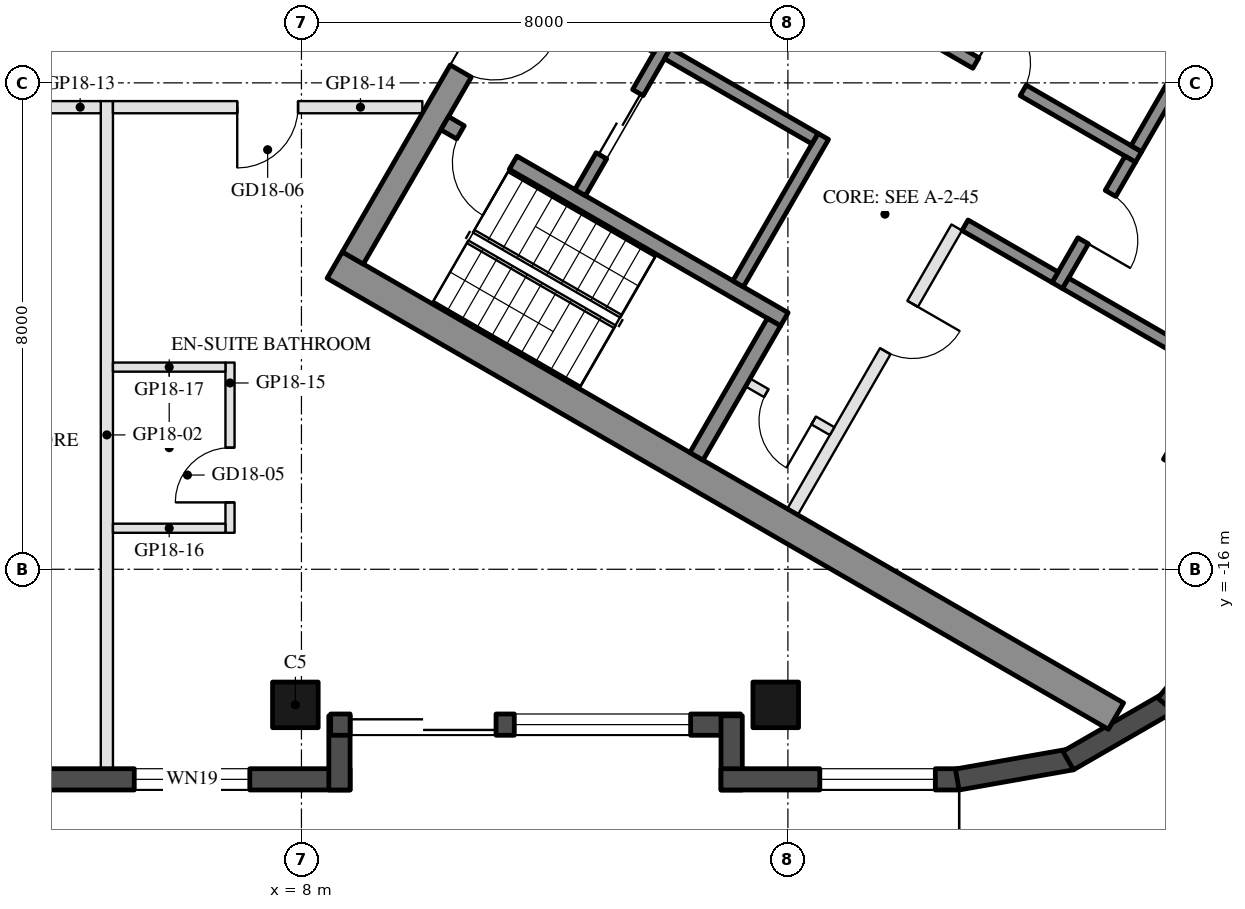
"""IFC4 building model, lengths in metres.
Left out: names, types, materials, properties, quantities, classifications, styles, units other than length and angle.
Written with IfcOpenShell. Run it as: python <this file> out.ifc"""

import sys

from ifc_helpers import new_model, si_unit, direction, frame, frame_2d, origin, origin_2d, place, context, subcontext, project, spatial, rectangle, hollow_rectangle, extrude, element, fill, save


model = new_model("IFC4")
c1 = context("Model", 3, precision=1e-05, world=origin(), true_north=direction((0.0, 1.0)))
c2 = subcontext(c1, "Body", "Model", "MODEL_VIEW")
j1 = project(units=[si_unit("LENGTHUNIT", "METRE"), si_unit("PLANEANGLEUNIT", "RADIAN")], contexts=[c1])
p1 = place(None, origin())
s1 = spatial("IfcSite", under=j1, at=p1, CompositionType="ELEMENT")
p2 = place(p1, origin())
s2 = spatial("IfcBuilding", under=s1, at=p2, CompositionType="ELEMENT")
p3 = place(p2, frame((0.0, 0.0, 198.4)))
s3 = spatial("IfcBuildingStorey", under=s2, at=p3, CompositionType="ELEMENT", Elevation=198.4)
for number, where, z_axis, x_axis in (
    (1, (7.9, -18.23, 0.0), (0.0, 0.0, 1.0), (-1.0, 0.0, 0.0)),
    (2, (15.8, -18.23, 0.0), (0.0, 0.0, 1.0), (-1.0, 0.0, 0.0)),
):
    element("IfcColumn", number, at=place(p3, frame(where, z_axis=z_axis, x_axis=x_axis)), inside=s3, PredefinedType="COLUMN", context=c2, shape_type="SweptSolid", body=[
        extrude(hollow_rectangle(XDim=0.75, YDim=0.75, WallThickness=0.035, at=origin_2d()), origin(), (0.0, 0.0, 1.0), 3.7),
    ])
p4 = place(p3, frame((23.729, -13.7, 0.0), z_axis=(0.0, 0.0, 1.0), x_axis=(0.5, 0.866025403784, 0.0)))
e3 = element("IfcColumn", 3, at=p4, inside=s3, PredefinedType="COLUMN", context=c2, shape_type="SweptSolid", body=[
    extrude(hollow_rectangle(XDim=2.4, YDim=2.2, WallThickness=0.06, at=origin_2d()), origin(), (0.0, 0.0, 1.0), 3.7),
])
p5 = place(p3, frame((-0.9, -19.455, 0.0), z_axis=(0.0, 0.0, 1.0), x_axis=(1.0, 0.0, 0.0)))
e4 = element("IfcWall", 4, at=p5, inside=s3, PredefinedType="SOLIDWALL", context=c2, shape_type="SweptSolid", body=[
    extrude(rectangle(XDim=9.7, YDim=0.35, at=frame_2d((4.85, 0.0))), origin(), (0.0, 0.0, 1.0), 3.55),
])
p6 = place(p5, frame((6.15, 0.0, 0.3)))
e5 = element("IfcOpeningElement", 5, at=p6, cuts=e4, PredefinedType="OPENING", context=c2, shape_type="SweptSolid", body=[
    extrude(rectangle(XDim=1.9, YDim=2.65, at=frame_2d((0.95, 1.325))), frame((0.0, 0.185, 0.0), z_axis=(0.0, -1.0, 0.0), x_axis=(1.0, 0.0, 0.0)), (0.0, 0.0, 1.0), 0.37),
])
p7 = place(p3, frame((8.625, -19.63, 0.0), z_axis=(0.0, 0.0, 1.0), x_axis=(0.0, 1.0, 0.0)))
e6 = element("IfcWall", 6, at=p7, inside=s3, PredefinedType="SOLIDWALL", context=c2, shape_type="SweptSolid", body=[
    extrude(rectangle(XDim=1.22, YDim=0.35, at=frame_2d((0.61, 0.0))), origin(), (0.0, 0.0, 1.0), 3.55),
])
p8 = place(p3, frame((8.48, -18.555, 0.0), z_axis=(0.0, 0.0, 1.0), x_axis=(1.0, 0.0, 0.0)))
e7 = element("IfcWall", 7, at=p8, inside=s3, PredefinedType="SOLIDWALL", context=c2, shape_type="SweptSolid", body=[
    extrude(rectangle(XDim=6.74, YDim=0.35, at=frame_2d((3.37, 0.0))), origin(), (0.0, 0.0, 1.0), 3.55),
])
p9 = place(p8, frame((0.32, 0.0, 0.0)))
e8 = element("IfcOpeningElement", 8, at=p9, cuts=e7, PredefinedType="OPENING", context=c2, shape_type="SweptSolid", body=[
    extrude(rectangle(XDim=2.4, YDim=2.4, at=frame_2d((1.2, 1.2))), frame((0.0, 0.185, 0.0), z_axis=(0.0, -1.0, 0.0), x_axis=(1.0, 0.0, 0.0)), (0.0, 0.0, 1.0), 0.37),
])
p10 = place(p8, frame((3.02, 0.0, 0.3)))
e9 = element("IfcOpeningElement", 9, at=p10, cuts=e7, PredefinedType="OPENING", context=c2, shape_type="SweptSolid", body=[
    extrude(rectangle(XDim=2.9, YDim=2.65, at=frame_2d((1.45, 1.325))), frame((0.0, 0.185, 0.0), z_axis=(0.0, -1.0, 0.0), x_axis=(1.0, 0.0, 0.0)), (0.0, 0.0, 1.0), 0.37),
])
p11 = place(p3, frame((15.075, -18.41, 0.0), z_axis=(0.0, 0.0, 1.0), x_axis=(0.0, -1.0, 0.0)))
e10 = element("IfcWall", 10, at=p11, inside=s3, PredefinedType="SOLIDWALL", context=c2, shape_type="SweptSolid", body=[
    extrude(rectangle(XDim=1.22, YDim=0.35, at=frame_2d((0.61, 0.0))), origin(), (0.0, 0.0, 1.0), 3.55),
])
p12 = place(p3, frame((14.9, -19.455, 0.0), z_axis=(0.0, 0.0, 1.0), x_axis=(1.0, 0.0, 0.0)))
e11 = element("IfcWall", 11, at=p12, inside=s3, PredefinedType="SOLIDWALL", context=c2, shape_type="SweptSolid", body=[
    extrude(rectangle(XDim=3.916, YDim=0.35, at=frame_2d((1.958, 0.0))), origin(), (0.0, 0.0, 1.0), 3.55),
])
p13 = place(p12, frame((1.625, 0.0, 0.3)))
e12 = element("IfcOpeningElement", 12, at=p13, cuts=e11, PredefinedType="OPENING", context=c2, shape_type="SweptSolid", body=[
    extrude(rectangle(XDim=1.9, YDim=2.65, at=frame_2d((0.95, 1.325))), frame((0.0, 0.185, 0.0), z_axis=(0.0, -1.0, 0.0), x_axis=(1.0, 0.0, 0.0)), (0.0, 0.0, 1.0), 0.37),
])
p14 = place(p3, frame((18.785, -19.458, 0.0), z_axis=(0.0, 0.0, 1.0), x_axis=(0.984798995425, 0.173697837091, 0.0)))
e13 = element("IfcWall", 13, at=p14, inside=s3, PredefinedType="SOLIDWALL", context=c2, shape_type="SweptSolid", body=[
    extrude(rectangle(XDim=1.91, YDim=0.35, at=frame_2d((0.955, 0.0))), origin(), (0.0, 0.0, 1.0), 3.55),
])
for number, where, z_axis, x_axis in (
    (14, (20.61, -19.147, 0.0), (0.0, 0.0, 1.0), (0.866, 0.5, 0.0)),
    (15, (22.217, -18.231, 0.0), (0.0, 0.0, 1.0), (0.643, 0.766, 0.0)),
):
    element("IfcWall", number, at=place(p3, frame(where, z_axis=z_axis, x_axis=x_axis)), inside=s3, PredefinedType="SOLIDWALL", context=c2, shape_type="SweptSolid", body=[
        extrude(rectangle(XDim=1.91, YDim=0.35, at=frame_2d((0.955, 0.0))), origin(), (0.0, 0.0, 1.0), 3.55),
    ])
for number, where, z_axis, x_axis in (
    (16, (8.547, -10.997, 0.0), (0.0, 0.0, 1.0), (0.866, -0.5, 0.0)),
    (17, (13.797, -1.903, 0.0), (0.0, 0.0, 1.0), (0.866, -0.5, 0.0)),
):
    element("IfcWall", number, at=place(p3, frame(where, z_axis=z_axis, x_axis=x_axis)), inside=s3, PredefinedType="SHEAR", context=c2, shape_type="SweptSolid", body=[
        extrude(rectangle(XDim=14.837, YDim=0.5, at=frame_2d((7.418, 0.0))), origin(), (0.0, 0.0, 1.0), 3.5),
    ])
p15 = place(p3, frame((8.845, -10.88, 0.0), z_axis=(0.0, 0.0, 1.0), x_axis=(0.500004234368, 0.866022959057, 0.0)))
e18 = element("IfcWall", 18, at=p15, inside=s3, PredefinedType="SHEAR", context=c2, shape_type="SweptSolid", body=[
    extrude(rectangle(XDim=10.0, YDim=0.4, at=frame_2d((5.0, 0.0))), origin(), (0.0, 0.0, 1.0), 3.5),
])
p16 = place(p15, frame((3.55, 0.0, 0.0)))
e19 = element("IfcOpeningElement", 19, at=p16, cuts=e18, PredefinedType="OPENING", context=c2, shape_type="SweptSolid", body=[
    extrude(rectangle(XDim=1.1, YDim=2.1, at=frame_2d((0.55, 1.05))), frame((0.0, 0.21, 0.0), z_axis=(0.0, -1.0, 0.0), x_axis=(1.0, 0.0, 0.0)), (0.0, 0.0, 1.0), 0.42),
])
p17 = place(p15, frame((5.85, 0.0, 0.0)))
e20 = element("IfcOpeningElement", 20, at=p17, cuts=e18, PredefinedType="OPENING", context=c2, shape_type="SweptSolid", body=[
    extrude(rectangle(XDim=1.4, YDim=2.1, at=frame_2d((0.7, 1.05))), frame((0.0, 0.21, 0.0), z_axis=(0.0, -1.0, 0.0), x_axis=(1.0, 0.0, 0.0)), (0.0, 0.0, 1.0), 0.42),
])
p18 = place(p3, frame((10.356, -8.664, 0.0), z_axis=(0.0, 0.0, 1.0), x_axis=(0.866028629588, -0.499994412703, 0.0)))
e21 = element("IfcWall", 21, at=p18, inside=s3, PredefinedType="SHEAR", context=c2, shape_type="SweptSolid", body=[
    extrude(rectangle(XDim=6.45, YDim=0.25, at=frame_2d((3.225, 0.0))), origin(), (0.0, 0.0, 1.0), 3.5),
])
p19 = place(p18, frame((0.3, 0.0, 0.0)))
e22 = element("IfcOpeningElement", 22, at=p19, cuts=e21, PredefinedType="OPENING", context=c2, shape_type="SweptSolid", body=[
    extrude(rectangle(XDim=1.0, YDim=2.1, at=frame_2d((0.5, 1.05))), frame((0.0, 0.135, 0.0), z_axis=(0.0, -1.0, 0.0), x_axis=(1.0, 0.0, 0.0)), (0.0, 0.0, 1.0), 0.27),
])
p20 = place(p3, frame((14.496, -14.143, 0.0), z_axis=(0.0, 0.0, 1.0), x_axis=(0.500062241894, 0.865989465428, 0.0)))
e23 = element("IfcWall", 23, at=p20, inside=s3, PredefinedType="SHEAR", context=c2, shape_type="SweptSolid", body=[
    extrude(rectangle(XDim=2.55, YDim=0.25, at=frame_2d((1.275, 0.0))), origin(), (0.0, 0.0, 1.0), 3.5),
])
p21 = place(p3, frame((15.181, -11.305, 0.0), z_axis=(0.0, 0.0, 1.0), x_axis=(0.49994636267, 0.866056369097, 0.0)))
e24 = element("IfcWall", 24, at=p21, inside=s3, PredefinedType="SHEAR", context=c2, shape_type="SweptSolid", body=[
    extrude(rectangle(XDim=2.8, YDim=0.2, at=frame_2d((1.4, 0.0))), origin(), (0.0, 0.0, 1.0), 3.5),
])
p22 = place(p3, frame((12.583, -9.805, 0.0), z_axis=(0.0, 0.0, 1.0), x_axis=(0.49994636267, 0.866056369097, 0.0)))
e25 = element("IfcWall", 25, at=p22, inside=s3, PredefinedType="SHEAR", context=c2, shape_type="SweptSolid", body=[
    extrude(rectangle(XDim=2.8, YDim=0.2, at=frame_2d((1.4, 0.0))), origin(), (0.0, 0.0, 1.0), 3.5),
])
p23 = place(p22, frame((0.7, 0.0, 0.0)))
e26 = element("IfcOpeningElement", 26, at=p23, cuts=e25, PredefinedType="OPENING", context=c2, shape_type="SweptSolid", body=[
    extrude(rectangle(XDim=1.2, YDim=2.1, at=frame_2d((0.6, 1.05))), frame((0.0, 0.11, 0.0), z_axis=(0.0, -1.0, 0.0), x_axis=(1.0, 0.0, 0.0)), (0.0, 0.0, 1.0), 0.22),
])
p24 = place(p3, frame((11.768, -6.217, 0.0), z_axis=(0.0, 0.0, 1.0), x_axis=(0.866050077142, -0.499957262057, 0.0)))
e27 = element("IfcWall", 27, at=p24, inside=s3, PredefinedType="SHEAR", context=c2, shape_type="SweptSolid", body=[
    extrude(rectangle(XDim=2.4, YDim=0.2, at=frame_2d((1.2, 0.0))), origin(), (0.0, 0.0, 1.0), 3.5),
])
p25 = place(p3, frame((14.02, -7.517, 0.0), z_axis=(0.0, 0.0, 1.0), x_axis=(0.866034573852, -0.49998411664, 0.0)))
e28 = element("IfcWall", 28, at=p25, inside=s3, PredefinedType="SHEAR", context=c2, shape_type="SweptSolid", body=[
    extrude(rectangle(XDim=2.8, YDim=0.2, at=frame_2d((1.4, 0.0))), origin(), (0.0, 0.0, 1.0), 3.5),
])
p26 = place(p3, frame((12.968, -4.138, 0.0), z_axis=(0.0, 0.0, 1.0), x_axis=(0.866028328073, -0.49999493495, 0.0)))
e29 = element("IfcWall", 29, at=p26, inside=s3, PredefinedType="SHEAR", context=c2, shape_type="SweptSolid", body=[
    extrude(rectangle(XDim=10.16, YDim=0.2, at=frame_2d((5.08, 0.0))), origin(), (0.0, 0.0, 1.0), 3.5),
])
p27 = place(p26, frame((1.99, 0.0, 0.0)))
e30 = element("IfcOpeningElement", 30, at=p27, cuts=e29, PredefinedType="OPENING", context=c2, shape_type="SweptSolid", body=[
    extrude(rectangle(XDim=0.9, YDim=2.1, at=frame_2d((0.45, 1.05))), frame((0.0, 0.11, 0.0), z_axis=(0.0, -1.0, 0.0), x_axis=(1.0, 0.0, 0.0)), (0.0, 0.0, 1.0), 0.22),
])
p28 = place(p26, frame((7.07, 0.0, 0.0)))
e31 = element("IfcOpeningElement", 31, at=p28, cuts=e29, PredefinedType="OPENING", context=c2, shape_type="SweptSolid", body=[
    extrude(rectangle(XDim=0.9, YDim=2.1, at=frame_2d((0.45, 1.05))), frame((0.0, 0.11, 0.0), z_axis=(0.0, -1.0, 0.0), x_axis=(1.0, 0.0, 0.0)), (0.0, 0.0, 1.0), 0.22),
])
p29 = place(p3, frame((20.43, -11.333, 0.0), z_axis=(0.0, 0.0, 1.0), x_axis=(0.500001309137, 0.866024647952, 0.0)))
e32 = element("IfcWall", 32, at=p29, inside=s3, PredefinedType="SHEAR", context=c2, shape_type="SweptSolid", body=[
    extrude(rectangle(XDim=2.4, YDim=0.2, at=frame_2d((1.2, 0.0))), origin(), (0.0, 0.0, 1.0), 3.5),
])
p30 = place(p29, frame((0.85, 0.0, 0.0)))
e33 = element("IfcOpeningElement", 33, at=p30, cuts=e32, PredefinedType="OPENING", context=c2, shape_type="SweptSolid", body=[
    extrude(rectangle(XDim=0.9, YDim=2.1, at=frame_2d((0.45, 1.05))), frame((0.0, 0.11, 0.0), z_axis=(0.0, -1.0, 0.0), x_axis=(1.0, 0.0, 0.0)), (0.0, 0.0, 1.0), 0.22),
])
p31 = place(p3, frame((18.913, -10.342, 0.0), z_axis=(0.0, 0.0, 1.0), x_axis=(0.866038183914, -0.499977863513, 0.0)))
e34 = element("IfcWall", 34, at=p31, inside=s3, PredefinedType="SHEAR", context=c2, shape_type="SweptSolid", body=[
    extrude(rectangle(XDim=1.71, YDim=0.2, at=frame_2d((0.855, 0.0))), origin(), (0.0, 0.0, 1.0), 3.5),
])
p32 = place(p3, frame((21.73, -9.082, 0.0), z_axis=(0.0, 0.0, 1.0), x_axis=(0.50002537861, 0.866010750942, 0.0)))
e35 = element("IfcWall", 35, at=p32, inside=s3, PredefinedType="SHEAR", context=c2, shape_type="SweptSolid", body=[
    extrude(rectangle(XDim=2.0, YDim=0.2, at=frame_2d((1.0, 0.0))), origin(), (0.0, 0.0, 1.0), 3.5),
])
p33 = place(p3, frame((20.567, -11.297, 0.0), z_axis=(0.0, 0.0, 1.0), x_axis=(0.866055327414, -0.49994816717, 0.0)))
e36 = element("IfcWall", 36, at=p33, inside=s3, PredefinedType="SHEAR", context=c2, shape_type="SweptSolid", body=[
    extrude(rectangle(XDim=2.84, YDim=0.2, at=frame_2d((1.42, 0.0))), origin(), (0.0, 0.0, 1.0), 3.5),
])
p34 = place(p3, frame((16.076, -15.055, 0.0), z_axis=(0.0, 0.0, 1.0), x_axis=(0.499995103361, 0.866028230842, 0.0)))
e37 = element("IfcWall", 37, at=p34, inside=s3, PredefinedType="PARTITIONING", context=c2, shape_type="SweptSolid", body=[
    extrude(rectangle(XDim=5.4, YDim=0.2, at=frame_2d((2.7, 0.0))), origin(), (0.0, 0.0, 1.0), 3.5),
])
p35 = place(p34, frame((3.05, 0.0, 0.0)))
e38 = element("IfcOpeningElement", 38, at=p35, cuts=e37, PredefinedType="OPENING", context=c2, shape_type="SweptSolid", body=[
    extrude(rectangle(XDim=0.9, YDim=2.1, at=frame_2d((0.45, 1.05))), frame((0.0, 0.11, 0.0), z_axis=(0.0, -1.0, 0.0), x_axis=(1.0, 0.0, 0.0)), (0.0, 0.0, 1.0), 0.22),
])
p36 = place(p3, frame((15.342, -12.928, 0.0), z_axis=(0.0, 0.0, 1.0), x_axis=(0.865989903783, -0.500061482766, 0.0)))
e39 = element("IfcWall", 39, at=p36, inside=s3, PredefinedType="PARTITIONING", context=c2, shape_type="SweptSolid", body=[
    extrude(rectangle(XDim=1.6, YDim=0.15, at=frame_2d((0.8, 0.0))), origin(), (0.0, 0.0, 1.0), 3.5),
])
p37 = place(p36, frame((0.35, 0.0, 0.0)))
e40 = element("IfcOpeningElement", 40, at=p37, cuts=e39, PredefinedType="OPENING", context=c2, shape_type="SweptSolid", body=[
    extrude(rectangle(XDim=0.9, YDim=2.1, at=frame_2d((0.45, 1.05))), frame((0.0, 0.085, 0.0), z_axis=(0.0, -1.0, 0.0), x_axis=(1.0, 0.0, 0.0)), (0.0, 0.0, 1.0), 0.17),
])
p38 = place(p3, frame((4.8, -19.28, 0.0), z_axis=(0.0, 0.0, 1.0), x_axis=(0.0, 1.0, 0.0)))
e41 = element("IfcWall", 41, at=p38, inside=s3, PredefinedType="PARTITIONING", context=c2, shape_type="SweptSolid", body=[
    extrude(rectangle(XDim=10.98, YDim=0.2, at=frame_2d((5.49, 0.0))), origin(), (0.0, 0.0, 1.0), 3.06),
])
p39 = place(p3, frame((4.7, -8.4, 0.0), z_axis=(0.0, 0.0, 1.0), x_axis=(-1.0, 0.0, 0.0)))
e42 = element("IfcWall", 42, at=p39, inside=s3, PredefinedType="PARTITIONING", context=c2, shape_type="SweptSolid", body=[
    extrude(rectangle(XDim=2.826, YDim=0.2, at=frame_2d((1.413, 0.0))), origin(), (0.0, 0.0, 1.0), 2.95),
])
p40 = place(p39, frame((0.963, 0.0, 0.0)))
e43 = element("IfcOpeningElement", 43, at=p40, cuts=e42, PredefinedType="OPENING", context=c2, shape_type="SweptSolid", body=[
    extrude(rectangle(XDim=0.9, YDim=2.1, at=frame_2d((0.45, 1.05))), frame((0.0, 0.11, 0.0), z_axis=(0.0, -1.0, 0.0), x_axis=(1.0, 0.0, 0.0)), (0.0, 0.0, 1.0), 0.22),
])
p41 = place(p3, frame((9.988, -8.4, 0.0), z_axis=(0.0, 0.0, 1.0), x_axis=(-1.0, 0.0, 0.0)))
e44 = element("IfcWall", 44, at=p41, inside=s3, PredefinedType="PARTITIONING", context=c2, shape_type="SweptSolid", body=[
    extrude(rectangle(XDim=5.088, YDim=0.2, at=frame_2d((2.544, 0.0))), origin(), (0.0, 0.0, 1.0), 2.95),
])
p42 = place(p41, frame((2.044, 0.0, 0.0)))
e45 = element("IfcOpeningElement", 45, at=p42, cuts=e44, PredefinedType="OPENING", context=c2, shape_type="SweptSolid", body=[
    extrude(rectangle(XDim=1.0, YDim=2.1, at=frame_2d((0.5, 1.05))), frame((0.0, 0.11, 0.0), z_axis=(0.0, -1.0, 0.0), x_axis=(1.0, 0.0, 0.0)), (0.0, 0.0, 1.0), 0.22),
])
p43 = place(p3, frame((6.825, -15.4, 0.0), z_axis=(0.0, 0.0, 1.0), x_axis=(0.0, 1.0, 0.0)))
e46 = element("IfcWall", 46, at=p43, inside=s3, PredefinedType="PARTITIONING", context=c2, shape_type="SweptSolid", body=[
    extrude(rectangle(XDim=2.8, YDim=0.15, at=frame_2d((1.4, 0.0))), origin(), (0.0, 0.0, 1.0), 3.55),
])
p44 = place(p43, frame((0.5, 0.0, 0.0)))
e47 = element("IfcOpeningElement", 47, at=p44, cuts=e46, PredefinedType="OPENING", context=c2, shape_type="SweptSolid", body=[
    extrude(rectangle(XDim=0.9, YDim=2.1, at=frame_2d((0.45, 1.05))), frame((0.0, 0.085, 0.0), z_axis=(0.0, -1.0, 0.0), x_axis=(1.0, 0.0, 0.0)), (0.0, 0.0, 1.0), 0.17),
])
for number, where, z_axis, x_axis in (
    (48, (4.9, -15.325, 0.0), (0.0, 0.0, 1.0), (1.0, 0.0, 0.0)),
    (49, (4.9, -12.675, 0.0), (0.0, 0.0, 1.0), (1.0, 0.0, 0.0)),
):
    element("IfcWall", number, at=place(p3, frame(where, z_axis=z_axis, x_axis=x_axis)), inside=s3, PredefinedType="PARTITIONING", context=c2, shape_type="SweptSolid", body=[
        extrude(rectangle(XDim=1.85, YDim=0.15, at=frame_2d((0.925, 0.0))), origin(), (0.0, 0.0, 1.0), 3.55),
    ])
p45 = place(p6, origin())
e50 = element("IfcWindow", 50, at=p45, inside=s3, PartitioningType="SINGLE_PANEL", PredefinedType="WINDOW", context=c2, shape_type="SweptSolid", body=[
    extrude(rectangle(XDim=1.9, YDim=2.65, at=frame_2d((0.95, 1.325))), frame((0.0, 0.03, 0.0), z_axis=(0.0, -1.0, 0.0), x_axis=(1.0, 0.0, 0.0)), (0.0, 0.0, 1.0), 0.06),
])
fill(e5, e50)
p46 = place(p9, frame((2.4, 0.0, 0.0), z_axis=(0.0, 0.0, 1.0), x_axis=(-1.0, 0.0, 0.0)))
e51 = element("IfcDoor", 51, at=p46, inside=s3, OperationType="SLIDING_TO_LEFT", PredefinedType="DOOR", context=c2, shape_type="SweptSolid", body=[
    extrude(rectangle(XDim=2.4, YDim=2.4, at=frame_2d((1.2, 1.2))), frame((0.0, 0.025, 0.0), z_axis=(0.0, -1.0, 0.0), x_axis=(1.0, 0.0, 0.0)), (0.0, 0.0, 1.0), 0.05),
])
fill(e8, e51)
p47 = place(p10, origin())
e52 = element("IfcWindow", 52, at=p47, inside=s3, PartitioningType="SINGLE_PANEL", PredefinedType="WINDOW", context=c2, shape_type="SweptSolid", body=[
    extrude(rectangle(XDim=2.9, YDim=2.65, at=frame_2d((1.45, 1.325))), frame((0.0, 0.03, 0.0), z_axis=(0.0, -1.0, 0.0), x_axis=(1.0, 0.0, 0.0)), (0.0, 0.0, 1.0), 0.06),
])
fill(e9, e52)
p48 = place(p13, origin())
e53 = element("IfcWindow", 53, at=p48, inside=s3, PartitioningType="SINGLE_PANEL", PredefinedType="WINDOW", context=c2, shape_type="SweptSolid", body=[
    extrude(rectangle(XDim=1.9, YDim=2.65, at=frame_2d((0.95, 1.325))), frame((0.0, 0.03, 0.0), z_axis=(0.0, -1.0, 0.0), x_axis=(1.0, 0.0, 0.0)), (0.0, 0.0, 1.0), 0.06),
])
fill(e12, e53)
p49 = place(p23, origin())
e54 = element("IfcDoor", 54, at=p49, inside=s3, OperationType="DOUBLE_DOOR_SLIDING", PredefinedType="DOOR", context=c2, shape_type="SweptSolid", body=[
    extrude(rectangle(XDim=1.2, YDim=2.1, at=frame_2d((0.6, 1.05))), frame((0.0, 0.025, 0.0), z_axis=(0.0, -1.0, 0.0), x_axis=(1.0, 0.0, 0.0)), (0.0, 0.0, 1.0), 0.05),
])
fill(e26, e54)
p50 = place(p37, frame((0.9, 0.0, 0.0), z_axis=(0.0, 0.0, 1.0), x_axis=(-1.0, 0.0, 0.0)))
e55 = element("IfcDoor", 55, at=p50, inside=s3, OperationType="SINGLE_SWING_LEFT", PredefinedType="DOOR", context=c2, shape_type="SweptSolid", body=[
    extrude(rectangle(XDim=0.9, YDim=2.1, at=frame_2d((0.45, 1.05))), frame((0.0, 0.025, 0.0), z_axis=(0.0, -1.0, 0.0), x_axis=(1.0, 0.0, 0.0)), (0.0, 0.0, 1.0), 0.05),
])
fill(e40, e55)
p51 = place(p28, origin())
e56 = element("IfcDoor", 56, at=p51, inside=s3, OperationType="SINGLE_SWING_LEFT", PredefinedType="DOOR", context=c2, shape_type="SweptSolid", body=[
    extrude(rectangle(XDim=0.9, YDim=2.1, at=frame_2d((0.45, 1.05))), frame((0.0, 0.025, 0.0), z_axis=(0.0, -1.0, 0.0), x_axis=(1.0, 0.0, 0.0)), (0.0, 0.0, 1.0), 0.05),
])
fill(e31, e56)
p52 = place(p30, frame((0.9, 0.0, 0.0), z_axis=(0.0, 0.0, 1.0), x_axis=(-1.0, 0.0, 0.0)))
e57 = element("IfcDoor", 57, at=p52, inside=s3, OperationType="SINGLE_SWING_RIGHT", PredefinedType="DOOR", context=c2, shape_type="SweptSolid", body=[
    extrude(rectangle(XDim=0.9, YDim=2.1, at=frame_2d((0.45, 1.05))), frame((0.0, 0.025, 0.0), z_axis=(0.0, -1.0, 0.0), x_axis=(1.0, 0.0, 0.0)), (0.0, 0.0, 1.0), 0.05),
])
fill(e33, e57)
p53 = place(p35, frame((0.9, 0.0, 0.0), z_axis=(0.0, 0.0, 1.0), x_axis=(-1.0, 0.0, 0.0)))
e58 = element("IfcDoor", 58, at=p53, inside=s3, OperationType="SINGLE_SWING_LEFT", PredefinedType="DOOR", context=c2, shape_type="SweptSolid", body=[
    extrude(rectangle(XDim=0.9, YDim=2.1, at=frame_2d((0.45, 1.05))), frame((0.0, 0.025, 0.0), z_axis=(0.0, -1.0, 0.0), x_axis=(1.0, 0.0, 0.0)), (0.0, 0.0, 1.0), 0.05),
])
fill(e38, e58)
p54 = place(p16, frame((1.1, 0.0, 0.0), z_axis=(0.0, 0.0, 1.0), x_axis=(-1.0, 0.0, 0.0)))
e59 = element("IfcDoor", 59, at=p54, inside=s3, OperationType="SINGLE_SWING_LEFT", PredefinedType="DOOR", context=c2, shape_type="SweptSolid", body=[
    extrude(rectangle(XDim=1.1, YDim=2.1, at=frame_2d((0.55, 1.05))), frame((0.0, 0.025, 0.0), z_axis=(0.0, -1.0, 0.0), x_axis=(1.0, 0.0, 0.0)), (0.0, 0.0, 1.0), 0.05),
])
fill(e19, e59)
p55 = place(p19, frame((1.0, 0.0, 0.0), z_axis=(0.0, 0.0, 1.0), x_axis=(-1.0, 0.0, 0.0)))
e60 = element("IfcDoor", 60, at=p55, inside=s3, OperationType="SINGLE_SWING_LEFT", PredefinedType="DOOR", context=c2, shape_type="SweptSolid", body=[
    extrude(rectangle(XDim=1.0, YDim=2.1, at=frame_2d((0.5, 1.05))), frame((0.0, 0.025, 0.0), z_axis=(0.0, -1.0, 0.0), x_axis=(1.0, 0.0, 0.0)), (0.0, 0.0, 1.0), 0.05),
])
fill(e22, e60)
p56 = place(p44, origin())
e61 = element("IfcDoor", 61, at=p56, inside=s3, OperationType="SINGLE_SWING_LEFT", PredefinedType="DOOR", context=c2, shape_type="SweptSolid", body=[
    extrude(rectangle(XDim=0.9, YDim=2.1, at=frame_2d((0.45, 1.05))), frame((0.0, 0.025, 0.0), z_axis=(0.0, -1.0, 0.0), x_axis=(1.0, 0.0, 0.0)), (0.0, 0.0, 1.0), 0.05),
])
fill(e47, e61)
p57 = place(p42, origin())
e62 = element("IfcDoor", 62, at=p57, inside=s3, OperationType="SINGLE_SWING_RIGHT", PredefinedType="DOOR", context=c2, shape_type="SweptSolid", body=[
    extrude(rectangle(XDim=1.0, YDim=2.1, at=frame_2d((0.5, 1.05))), frame((0.0, 0.025, 0.0), z_axis=(0.0, -1.0, 0.0), x_axis=(1.0, 0.0, 0.0)), (0.0, 0.0, 1.0), 0.05),
])
fill(e45, e62)
save(model, sys.argv[1])
